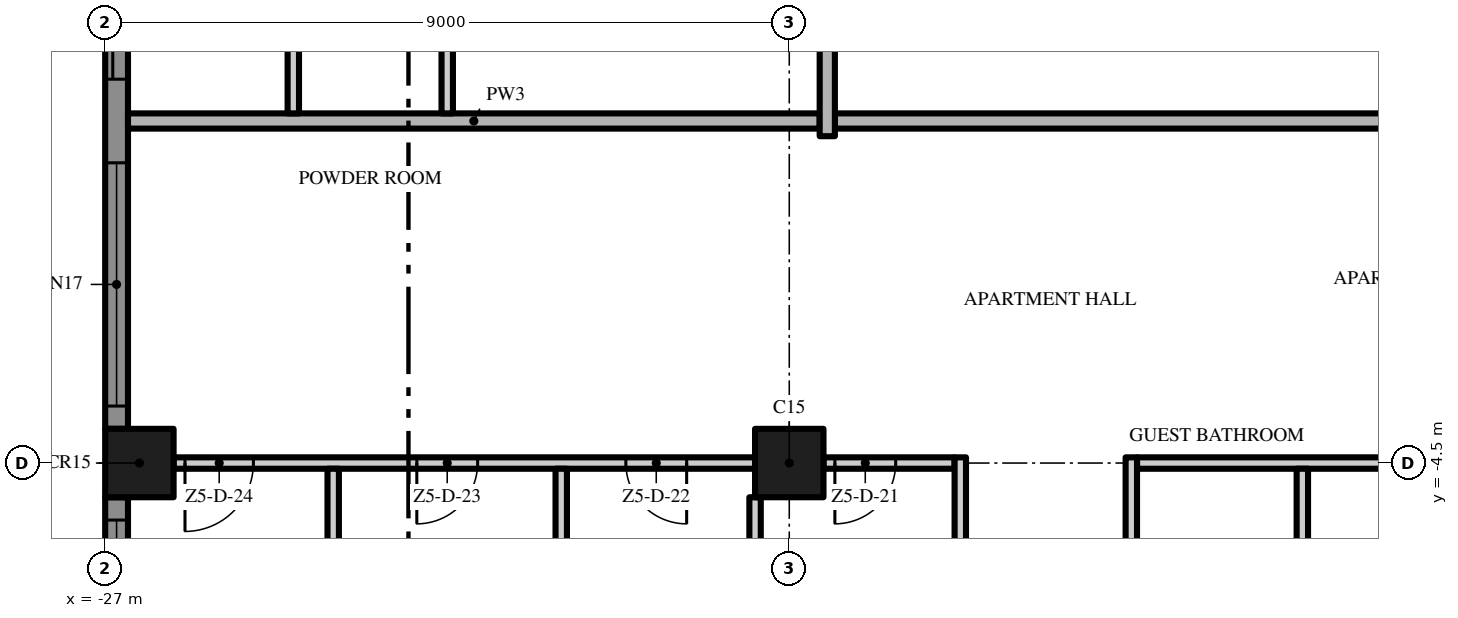
"""IFC4 building model, lengths in metres.
Left out: names, types, materials, properties, quantities, classifications, styles, units other than length and angle.
Written with IfcOpenShell. Run it as: python <this file> out.ifc"""

import sys

from ifc_helpers import new_model, si_unit, direction, frame, frame_2d, origin, origin_2d, place, context, subcontext, project, spatial, polyline, rectangle, outline, extrude, element, fill, save


model = new_model("IFC4")
c1 = context("Model", 3, precision=1e-05, world=origin(), true_north=direction((0.0, 1.0)))
c2 = subcontext(c1, "Body", "Model", "MODEL_VIEW")
j1 = project(units=[si_unit("LENGTHUNIT", "METRE"), si_unit("PLANEANGLEUNIT", "RADIAN")], contexts=[c1])
p1 = place(None, origin())
s1 = spatial("IfcSite", under=j1, at=p1, CompositionType="ELEMENT")
p2 = place(p1, origin())
s2 = spatial("IfcBuilding", under=s1, at=p2, CompositionType="ELEMENT")
p3 = place(p2, frame((0.0, 0.0, 276.8)))
s3 = spatial("IfcBuildingStorey", under=s2, at=p3, CompositionType="ELEMENT", Elevation=276.8)
for number, where, z_axis, x_axis in (
    (1, (-18.0, -4.5, 0.0), (0.0, 0.0, 1.0), (1.0, 0.0, 0.0)),
    (2, (-26.55, -4.5, 0.0), (0.0, 0.0, 1.0), (1.0, 0.0, 0.0)),
):
    element("IfcColumn", number, at=place(p3, frame(where, z_axis=z_axis, x_axis=x_axis)), inside=s3, PredefinedType="COLUMN", context=c2, shape_type="SweptSolid", body=[
        extrude(rectangle(XDim=0.9, YDim=0.9, at=origin_2d()), origin(), (0.0, 0.0, 1.0), 3.5),
    ])
p4 = place(p3, frame((-26.85, -4.05, 0.0), z_axis=(0.0, 0.0, 1.0), x_axis=(0.0, 1.0, 0.0)))
e3 = element("IfcWall", 3, at=p4, inside=s3, PredefinedType="SOLIDWALL", context=c2, shape_type="SweptSolid", body=[
    extrude(rectangle(XDim=8.1, YDim=0.3, at=frame_2d((4.05, 0.0))), origin(), (0.0, 0.0, 1.0), 3.5),
])
p5 = place(p4, frame((4.6, 0.0, 0.0)))
e4 = element("IfcOpeningElement", 4, at=p5, cuts=e3, PredefinedType="OPENING", context=c2, shape_type="SweptSolid", body=[
    extrude(rectangle(XDim=3.2, YDim=2.4, at=frame_2d((1.6, 1.2))), frame((0.0, 0.16, 0.0), z_axis=(0.0, -1.0, 0.0), x_axis=(1.0, 0.0, 0.0)), (0.0, 0.0, 1.0), 0.32),
])
p6 = place(p4, frame((0.3, 0.0, 0.45)))
e5 = element("IfcOpeningElement", 5, at=p6, cuts=e3, PredefinedType="OPENING", context=c2, shape_type="SweptSolid", body=[
    extrude(rectangle(XDim=3.2, YDim=2.65, at=frame_2d((1.6, 1.325))), frame((0.0, 0.16, 0.0), z_axis=(0.0, -1.0, 0.0), x_axis=(1.0, 0.0, 0.0)), (0.0, 0.0, 1.0), 0.32),
])
p7 = place(p3, frame((-26.85, -13.05, 0.0), z_axis=(0.0, 0.0, 1.0), x_axis=(0.0, 1.0, 0.0)))
e6 = element("IfcWall", 6, at=p7, inside=s3, PredefinedType="SOLIDWALL", context=c2, shape_type="SweptSolid", body=[
    extrude(rectangle(XDim=8.1, YDim=0.3, at=frame_2d((4.05, 0.0))), origin(), (0.0, 0.0, 1.0), 3.5),
])
p8 = place(p7, frame((4.6, 0.0, 0.45)))
e7 = element("IfcOpeningElement", 7, at=p8, cuts=e6, PredefinedType="OPENING", context=c2, shape_type="SweptSolid", body=[
    extrude(rectangle(XDim=3.2, YDim=2.65, at=frame_2d((1.6, 1.325))), frame((0.0, 0.16, 0.0), z_axis=(0.0, -1.0, 0.0), x_axis=(1.0, 0.0, 0.0)), (0.0, 0.0, 1.0), 0.32),
])
p9 = place(p7, frame((0.3, 0.0, 0.0)))
e8 = element("IfcOpeningElement", 8, at=p9, cuts=e6, PredefinedType="OPENING", context=c2, shape_type="SweptSolid", body=[
    extrude(rectangle(XDim=3.2, YDim=2.4, at=frame_2d((1.6, 1.2))), frame((0.0, 0.16, 0.0), z_axis=(0.0, -1.0, 0.0), x_axis=(1.0, 0.0, 0.0)), (0.0, 0.0, 1.0), 0.32),
])
p10 = place(p3, origin())
e9 = element("IfcWall", 9, at=p10, inside=s3, PredefinedType="USERDEFINED", context=c2, shape_type="SweptSolid", body=[
    extrude(outline(polyline([(-29.649, 18.0), (-29.985, 16.5), (-30.0, 16.125), (-29.869, 15.0), (-29.345, 13.5), (-28.612, 12.0), (-27.951, 10.5), (-27.615, 9.0), (-27.6, 8.625), (-27.731, 7.5), (-28.255, 6.0), (-28.988, 4.5), (-29.649, 3.0), (-29.985, 1.5), (-30.0, 1.125), (-29.869, 0.0), (-29.345, -1.5), (-28.612, -3.0), (-27.951, -4.5), (-27.615, -6.0), (-27.6, -6.375), (-27.731, -7.5), (-28.255, -9.0), (-28.988, -10.5), (-29.649, -12.0), (-29.985, -13.5), (-30.0, -13.875), (-29.869, -15.0), (-29.345, -16.5), (-28.612, -18.0), (-28.388, -17.89), (-29.114, -16.404), (-29.624, -14.944), (-29.749, -13.865), (-29.736, -13.533), (-29.41, -12.079), (-28.761, -10.605), (-28.024, -9.096), (-27.486, -7.556), (-27.349, -6.385), (-27.366, -5.967), (-27.713, -4.421), (-28.385, -2.895), (-29.114, -1.404), (-29.624, 0.056), (-29.749, 1.135), (-29.736, 1.467), (-29.41, 2.921), (-28.761, 4.395), (-28.024, 5.904), (-27.486, 7.444), (-27.349, 8.615), (-27.366, 9.033), (-27.713, 10.579), (-28.385, 12.105), (-29.114, 13.596), (-29.624, 15.056), (-29.749, 16.135), (-29.736, 16.467), (-29.405, 17.945), (-29.649, 18.0)])), origin(), (0.0, 0.0, 1.0), 0.9),
])
p11 = place(p3, frame((-18.45, -4.5, 0.0), z_axis=(0.0, 0.0, 1.0), x_axis=(-1.0, 0.0, 0.0)))
e10 = element("IfcWall", 10, at=p11, inside=s3, PredefinedType="PARTITIONING", context=c2, shape_type="SweptSolid", body=[
    extrude(rectangle(XDim=7.65, YDim=0.15, at=frame_2d((3.825, 0.0))), origin(), (0.0, 0.0, 1.0), 3.5),
])
p12 = place(p11, frame((0.9, 0.0, 0.0)))
e11 = element("IfcOpeningElement", 11, at=p12, cuts=e10, PredefinedType="OPENING", context=c2, shape_type="SweptSolid", body=[
    extrude(rectangle(XDim=0.8, YDim=2.0, at=frame_2d((0.4, 1.0))), frame((0.0, 0.085, 0.0), z_axis=(0.0, -1.0, 0.0), x_axis=(1.0, 0.0, 0.0)), (0.0, 0.0, 1.0), 0.17),
])
p13 = place(p11, frame((3.65, 0.0, 0.0)))
e12 = element("IfcOpeningElement", 12, at=p13, cuts=e10, PredefinedType="OPENING", context=c2, shape_type="SweptSolid", body=[
    extrude(rectangle(XDim=0.8, YDim=2.0, at=frame_2d((0.4, 1.0))), frame((0.0, 0.085, 0.0), z_axis=(0.0, -1.0, 0.0), x_axis=(1.0, 0.0, 0.0)), (0.0, 0.0, 1.0), 0.17),
])
p14 = place(p11, frame((6.6, 0.0, 0.0)))
e13 = element("IfcOpeningElement", 13, at=p14, cuts=e10, PredefinedType="OPENING", context=c2, shape_type="SweptSolid", body=[
    extrude(rectangle(XDim=0.9, YDim=2.1, at=frame_2d((0.45, 1.05))), frame((0.0, 0.085, 0.0), z_axis=(0.0, -1.0, 0.0), x_axis=(1.0, 0.0, 0.0)), (0.0, 0.0, 1.0), 0.17),
])
p15 = place(p3, frame((-15.825, -4.5, 0.0), z_axis=(0.0, 0.0, 1.0), x_axis=(-1.0, 0.0, 0.0)))
e14 = element("IfcWall", 14, at=p15, inside=s3, PredefinedType="PARTITIONING", context=c2, shape_type="SweptSolid", body=[
    extrude(rectangle(XDim=1.725, YDim=0.15, at=frame_2d((0.863, 0.0))), origin(), (0.0, 0.0, 1.0), 3.5),
])
p16 = place(p15, frame((0.775, 0.0, 0.0)))
e15 = element("IfcOpeningElement", 15, at=p16, cuts=e14, PredefinedType="OPENING", context=c2, shape_type="SweptSolid", body=[
    extrude(rectangle(XDim=0.8, YDim=2.0, at=frame_2d((0.4, 1.0))), frame((0.0, 0.085, 0.0), z_axis=(0.0, -1.0, 0.0), x_axis=(1.0, 0.0, 0.0)), (0.0, 0.0, 1.0), 0.17),
])
p17 = place(p3, frame((-13.425, -4.5, 0.0), z_axis=(0.0, 0.0, 1.0), x_axis=(1.0, 0.0, 0.0)))
e16 = element("IfcWall", 16, at=p17, inside=s3, PredefinedType="PARTITIONING", context=c2, shape_type="SweptSolid", body=[
    extrude(rectangle(XDim=3.975, YDim=0.15, at=frame_2d((1.988, 0.0))), origin(), (0.0, 0.0, 1.0), 3.5),
])
p18 = place(p3, frame((17.4, 0.0, 0.0), z_axis=(0.0, 0.0, 1.0), x_axis=(-1.0, 0.0, 0.0)))
e17 = element("IfcWall", 17, at=p18, inside=s3, PredefinedType="PARTITIONING", context=c2, shape_type="SweptSolid", body=[
    extrude(rectangle(XDim=34.8, YDim=0.2, at=frame_2d((17.4, 0.0))), origin(), (0.0, 0.0, 1.0), 3.5),
])
p19 = place(p18, frame((25.65, 0.0, 0.0)))
e18 = element("IfcOpeningElement", 18, at=p19, cuts=e17, PredefinedType="OPENING", context=c2, shape_type="SweptSolid", body=[
    extrude(rectangle(XDim=1.5, YDim=2.4, at=frame_2d((0.75, 1.2))), frame((0.0, 0.11, 0.0), z_axis=(0.0, -1.0, 0.0), x_axis=(1.0, 0.0, 0.0)), (0.0, 0.0, 1.0), 0.22),
])
p20 = place(p18, frame((7.65, 0.0, 0.0)))
e19 = element("IfcOpeningElement", 19, at=p20, cuts=e17, PredefinedType="OPENING", context=c2, shape_type="SweptSolid", body=[
    extrude(rectangle(XDim=1.5, YDim=2.4, at=frame_2d((0.75, 1.2))), frame((0.0, 0.11, 0.0), z_axis=(0.0, -1.0, 0.0), x_axis=(1.0, 0.0, 0.0)), (0.0, 0.0, 1.0), 0.22),
])
p21 = place(p3, frame((-26.7, 0.0, 0.0), z_axis=(0.0, 0.0, 1.0), x_axis=(1.0, 0.0, 0.0)))
e20 = element("IfcWall", 20, at=p21, inside=s3, PredefinedType="PARTITIONING", context=c2, shape_type="SweptSolid", body=[
    extrude(rectangle(XDim=9.1, YDim=0.2, at=frame_2d((4.55, 0.0))), origin(), (0.0, 0.0, 1.0), 3.5),
])
p22 = place(p3, frame((-24.525, 0.1, 0.0), z_axis=(0.0, 0.0, 1.0), x_axis=(0.0, 1.0, 0.0)))
e21 = element("IfcWall", 21, at=p22, inside=s3, PredefinedType="PARTITIONING", context=c2, shape_type="SweptSolid", body=[
    extrude(rectangle(XDim=2.225, YDim=0.15, at=frame_2d((1.113, 0.0))), origin(), (0.0, 0.0, 1.0), 3.5),
])
p23 = place(p3, frame((-24.0, -8.925, 0.0), z_axis=(0.0, 0.0, 1.0), x_axis=(0.0, 1.0, 0.0)))
e22 = element("IfcWall", 22, at=p23, inside=s3, PredefinedType="PARTITIONING", context=c2, shape_type="SweptSolid", body=[
    extrude(rectangle(XDim=4.35, YDim=0.15, at=frame_2d((2.175, 0.0))), origin(), (0.0, 0.0, 1.0), 3.5),
])
p24 = place(p3, frame((-22.5, 0.1, 0.0), z_axis=(0.0, 0.0, 1.0), x_axis=(0.0, 1.0, 0.0)))
e23 = element("IfcWall", 23, at=p24, inside=s3, PredefinedType="PARTITIONING", context=c2, shape_type="SweptSolid", body=[
    extrude(rectangle(XDim=17.45, YDim=0.15, at=frame_2d((8.725, 0.0))), origin(), (0.0, 0.0, 1.0), 3.5),
])
p25 = place(p24, frame((2.4, 0.0, 0.0)))
e24 = element("IfcOpeningElement", 24, at=p25, cuts=e23, PredefinedType="OPENING", context=c2, shape_type="SweptSolid", body=[
    extrude(rectangle(XDim=1.8, YDim=2.4, at=frame_2d((0.9, 1.2))), frame((0.0, 0.085, 0.0), z_axis=(0.0, -1.0, 0.0), x_axis=(1.0, 0.0, 0.0)), (0.0, 0.0, 1.0), 0.17),
])
p26 = place(p24, frame((10.65, 0.0, 0.0)))
e25 = element("IfcOpeningElement", 25, at=p26, cuts=e23, PredefinedType="OPENING", context=c2, shape_type="SweptSolid", body=[
    extrude(rectangle(XDim=1.0, YDim=2.4, at=frame_2d((0.5, 1.2))), frame((0.0, 0.085, 0.0), z_axis=(0.0, -1.0, 0.0), x_axis=(1.0, 0.0, 0.0)), (0.0, 0.0, 1.0), 0.17),
])
p27 = place(p3, frame((-21.0, -8.925, 0.0), z_axis=(0.0, 0.0, 1.0), x_axis=(0.0, 1.0, 0.0)))
e26 = element("IfcWall", 26, at=p27, inside=s3, PredefinedType="PARTITIONING", context=c2, shape_type="SweptSolid", body=[
    extrude(rectangle(XDim=4.35, YDim=0.15, at=frame_2d((2.175, 0.0))), origin(), (0.0, 0.0, 1.0), 3.5),
])
p28 = place(p3, frame((-18.45, -8.925, 0.0), z_axis=(0.0, 0.0, 1.0), x_axis=(0.0, 1.0, 0.0)))
e27 = element("IfcWall", 27, at=p28, inside=s3, PredefinedType="PARTITIONING", context=c2, shape_type="SweptSolid", body=[
    extrude(rectangle(XDim=3.975, YDim=0.15, at=frame_2d((1.988, 0.0))), origin(), (0.0, 0.0, 1.0), 3.5),
])
p29 = place(p3, frame((-17.5, -0.2, 0.0), z_axis=(0.0, 0.0, 1.0), x_axis=(0.0, 1.0, 0.0)))
e28 = element("IfcWall", 28, at=p29, inside=s3, PredefinedType="PARTITIONING", context=c2, shape_type="SweptSolid", body=[
    extrude(rectangle(XDim=4.25, YDim=0.2, at=frame_2d((2.125, 0.0))), origin(), (0.0, 0.0, 1.0), 3.5),
])
p30 = place(p3, frame((-15.75, -9.075, 0.0), z_axis=(0.0, 0.0, 1.0), x_axis=(0.0, 1.0, 0.0)))
e29 = element("IfcWall", 29, at=p30, inside=s3, PredefinedType="PARTITIONING", context=c2, shape_type="SweptSolid", body=[
    extrude(rectangle(XDim=4.65, YDim=0.15, at=frame_2d((2.325, 0.0))), origin(), (0.0, 0.0, 1.0), 3.5),
])
p31 = place(p3, frame((-13.5, -4.425, 0.0), z_axis=(0.0, 0.0, 1.0), x_axis=(0.0, -1.0, 0.0)))
e30 = element("IfcWall", 30, at=p31, inside=s3, PredefinedType="PARTITIONING", context=c2, shape_type="SweptSolid", body=[
    extrude(rectangle(XDim=4.65, YDim=0.15, at=frame_2d((2.325, 0.0))), origin(), (0.0, 0.0, 1.0), 3.5),
])
p32 = place(p31, frame((1.875, 0.0, 0.0)))
e31 = element("IfcOpeningElement", 31, at=p32, cuts=e30, PredefinedType="OPENING", context=c2, shape_type="SweptSolid", body=[
    extrude(rectangle(XDim=0.9, YDim=2.1, at=frame_2d((0.45, 1.05))), frame((0.0, 0.085, 0.0), z_axis=(0.0, -1.0, 0.0), x_axis=(1.0, 0.0, 0.0)), (0.0, 0.0, 1.0), 0.17),
])
p33 = place(p3, frame((-11.25, -8.925, 0.0), z_axis=(0.0, 0.0, 1.0), x_axis=(0.0, 1.0, 0.0)))
e32 = element("IfcWall", 32, at=p33, inside=s3, PredefinedType="PARTITIONING", context=c2, shape_type="SweptSolid", body=[
    extrude(rectangle(XDim=4.35, YDim=0.15, at=frame_2d((2.175, 0.0))), origin(), (0.0, 0.0, 1.0), 3.5),
])
p34 = place(p5, origin())
e33 = element("IfcDoor", 33, at=p34, inside=s3, OperationType="SINGLE_SWING_LEFT", PredefinedType="DOOR", context=c2, shape_type="SweptSolid", body=[
    extrude(rectangle(XDim=3.2, YDim=2.4, at=frame_2d((1.6, 1.2))), frame((0.0, 0.025, 0.0), z_axis=(0.0, -1.0, 0.0), x_axis=(1.0, 0.0, 0.0)), (0.0, 0.0, 1.0), 0.05),
])
fill(e4, e33)
p35 = place(p6, origin())
e34 = element("IfcWindow", 34, at=p35, inside=s3, PartitioningType="SINGLE_PANEL", PredefinedType="WINDOW", context=c2, shape_type="SweptSolid", body=[
    extrude(rectangle(XDim=3.2, YDim=2.65, at=frame_2d((1.6, 1.325))), frame((0.0, 0.03, 0.0), z_axis=(0.0, -1.0, 0.0), x_axis=(1.0, 0.0, 0.0)), (0.0, 0.0, 1.0), 0.06),
])
fill(e5, e34)
p36 = place(p8, origin())
e35 = element("IfcWindow", 35, at=p36, inside=s3, PartitioningType="SINGLE_PANEL", PredefinedType="WINDOW", context=c2, shape_type="SweptSolid", body=[
    extrude(rectangle(XDim=3.2, YDim=2.65, at=frame_2d((1.6, 1.325))), frame((0.0, 0.03, 0.0), z_axis=(0.0, -1.0, 0.0), x_axis=(1.0, 0.0, 0.0)), (0.0, 0.0, 1.0), 0.06),
])
fill(e7, e35)
p37 = place(p16, origin())
e36 = element("IfcDoor", 36, at=p37, inside=s3, OperationType="SINGLE_SWING_RIGHT", PredefinedType="DOOR", context=c2, shape_type="SweptSolid", body=[
    extrude(rectangle(XDim=0.8, YDim=2.0, at=frame_2d((0.4, 1.0))), frame((0.0, 0.025, 0.0), z_axis=(0.0, -1.0, 0.0), x_axis=(1.0, 0.0, 0.0)), (0.0, 0.0, 1.0), 0.05),
])
fill(e15, e36)
p38 = place(p12, origin())
e37 = element("IfcDoor", 37, at=p38, inside=s3, OperationType="SINGLE_SWING_LEFT", PredefinedType="DOOR", context=c2, shape_type="SweptSolid", body=[
    extrude(rectangle(XDim=0.8, YDim=2.0, at=frame_2d((0.4, 1.0))), frame((0.0, 0.025, 0.0), z_axis=(0.0, -1.0, 0.0), x_axis=(1.0, 0.0, 0.0)), (0.0, 0.0, 1.0), 0.05),
])
fill(e11, e37)
p39 = place(p13, origin())
e38 = element("IfcDoor", 38, at=p39, inside=s3, OperationType="SINGLE_SWING_RIGHT", PredefinedType="DOOR", context=c2, shape_type="SweptSolid", body=[
    extrude(rectangle(XDim=0.8, YDim=2.0, at=frame_2d((0.4, 1.0))), frame((0.0, 0.025, 0.0), z_axis=(0.0, -1.0, 0.0), x_axis=(1.0, 0.0, 0.0)), (0.0, 0.0, 1.0), 0.05),
])
fill(e12, e38)
p40 = place(p14, origin())
e39 = element("IfcDoor", 39, at=p40, inside=s3, OperationType="SINGLE_SWING_RIGHT", PredefinedType="DOOR", context=c2, shape_type="SweptSolid", body=[
    extrude(rectangle(XDim=0.9, YDim=2.1, at=frame_2d((0.45, 1.05))), frame((0.0, 0.025, 0.0), z_axis=(0.0, -1.0, 0.0), x_axis=(1.0, 0.0, 0.0)), (0.0, 0.0, 1.0), 0.05),
])
fill(e13, e39)
save(model, sys.argv[1])
